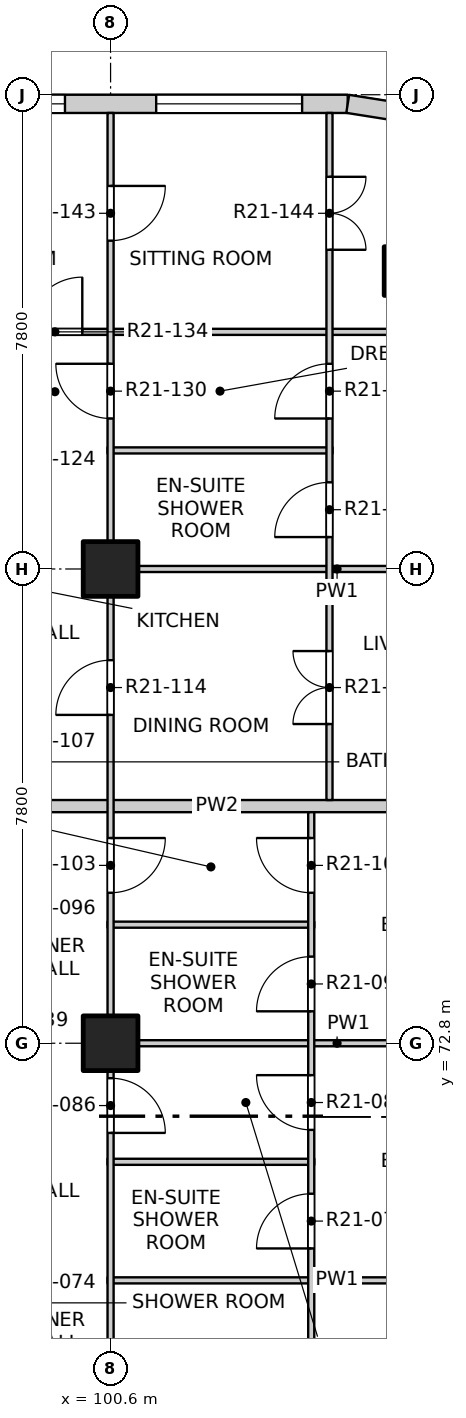
"""IFC4 building model, lengths in metres.
Left out: names, types, materials, properties, quantities, classifications, styles, units other than length and angle.
Written with IfcOpenShell. Run it as: python <this file> out.ifc"""

import sys

from ifc_helpers import new_model, si_unit, direction, frame, frame_2d, origin, origin_2d, place, context, subcontext, project, spatial, rectangle, extrude, element, fill, save


model = new_model("IFC4")
c1 = context("Model", 3, precision=1e-05, world=origin(), true_north=direction((0.0, 1.0)))
c2 = subcontext(c1, "Body", "Model", "MODEL_VIEW")
j1 = project(units=[si_unit("LENGTHUNIT", "METRE"), si_unit("PLANEANGLEUNIT", "RADIAN")], contexts=[c1])
p1 = place(None, origin())
s1 = spatial("IfcSite", under=j1, at=p1, CompositionType="ELEMENT")
p2 = place(p1, origin())
s2 = spatial("IfcBuilding", under=s1, at=p2, CompositionType="ELEMENT")
p3 = place(p2, frame((0.0, 0.0, 214.3)))
s3 = spatial("IfcBuildingStorey", under=s2, at=p3, CompositionType="ELEMENT", Elevation=214.3)
p4 = place(p3, frame((105.5, 85.5, -0.25), z_axis=(0.0, 0.0, 1.0), x_axis=(1.0, 0.0, 0.0)))
e1 = element("IfcColumn", 1, at=p4, inside=s3, PredefinedType="COLUMN", context=c2, shape_type="SweptSolid", body=[
    extrude(rectangle(XDim=0.8, YDim=0.8, at=origin_2d()), origin(), (0.0, 0.0, 1.0), 3.4),
])
for number, where, z_axis, x_axis in (
    (2, (100.6, 72.8, -0.25), (0.0, 0.0, 1.0), (1.0, 0.0, 0.0)),
    (3, (100.6, 80.6, -0.25), (0.0, 0.0, 1.0), (1.0, 0.0, 0.0)),
):
    element("IfcColumn", number, at=place(p3, frame(where, z_axis=z_axis, x_axis=x_axis)), inside=s3, PredefinedType="COLUMN", context=c2, shape_type="SweptSolid", body=[
        extrude(rectangle(XDim=0.9, YDim=0.9, at=origin_2d()), origin(), (0.0, 0.0, 1.0), 3.4),
    ])
p5 = place(p3, frame((97.1, 88.25, 0.0), z_axis=(0.0, 0.0, 1.0), x_axis=(1.0, 0.0, 0.0)))
e4 = element("IfcWall", 4, at=p5, inside=s3, PredefinedType="SOLIDWALL", context=c2, shape_type="SweptSolid", body=[
    extrude(rectangle(XDim=7.4, YDim=0.3, at=frame_2d((3.7, 0.0))), origin(), (0.0, 0.0, 1.0), 2.7),
])
p6 = place(p5, frame((0.35, 0.0, 0.9)))
e5 = element("IfcOpeningElement", 5, at=p6, cuts=e4, PredefinedType="OPENING", context=c2, shape_type="SweptSolid", body=[
    extrude(rectangle(XDim=2.4, YDim=1.8, at=frame_2d((1.2, 0.9))), frame((0.0, 0.16, 0.0), z_axis=(0.0, -1.0, 0.0), x_axis=(1.0, 0.0, 0.0)), (0.0, 0.0, 1.0), 0.32),
])
p7 = place(p5, frame((4.25, 0.0, 0.9)))
e6 = element("IfcOpeningElement", 6, at=p7, cuts=e4, PredefinedType="OPENING", context=c2, shape_type="SweptSolid", body=[
    extrude(rectangle(XDim=2.4, YDim=1.8, at=frame_2d((1.2, 0.9))), frame((0.0, 0.16, 0.0), z_axis=(0.0, -1.0, 0.0), x_axis=(1.0, 0.0, 0.0)), (0.0, 0.0, 1.0), 0.32),
])
p8 = place(p3, frame((105.659, 88.066, 0.0), z_axis=(0.0, 0.0, 1.0), x_axis=(-0.987678452879, 0.156496880861, 0.0)))
e7 = element("IfcWall", 7, at=p8, inside=s3, PredefinedType="SOLIDWALL", context=c2, shape_type="SweptSolid", body=[
    extrude(rectangle(XDim=1.173, YDim=0.3, at=frame_2d((0.586, 0.0))), origin(), (0.0, 0.0, 1.0), 2.7),
])
p9 = place(p3, frame((100.55, 68.9, 0.0), z_axis=(0.0, 0.0, 1.0), x_axis=(1.0, 0.0, 0.0)))
e8 = element("IfcWall", 8, at=p9, inside=s3, PredefinedType="PARTITIONING", context=c2, shape_type="SweptSolid", body=[
    extrude(rectangle(XDim=7.55, YDim=0.1, at=frame_2d((3.775, 0.0))), origin(), (0.0, 0.0, 1.0), 2.55),
])
p10 = place(p3, frame((100.55, 70.85, 0.0), z_axis=(0.0, 0.0, 1.0), x_axis=(1.0, 0.0, 0.0)))
e9 = element("IfcWall", 9, at=p10, inside=s3, PredefinedType="PARTITIONING", context=c2, shape_type="SweptSolid", body=[
    extrude(rectangle(XDim=3.4, YDim=0.1, at=frame_2d((1.7, 0.0))), origin(), (0.0, 0.0, 1.0), 3.15),
])
p11 = place(p3, frame((100.55, 72.8, 0.0), z_axis=(0.0, 0.0, 1.0), x_axis=(1.0, 0.0, 0.0)))
e10 = element("IfcWall", 10, at=p11, inside=s3, PredefinedType="PARTITIONING", context=c2, shape_type="SweptSolid", body=[
    extrude(rectangle(XDim=7.55, YDim=0.1, at=frame_2d((3.775, 0.0))), origin(), (0.0, 0.0, 1.0), 3.15),
])
p12 = place(p3, frame((100.55, 74.75, 0.0), z_axis=(0.0, 0.0, 1.0), x_axis=(1.0, 0.0, 0.0)))
e11 = element("IfcWall", 11, at=p12, inside=s3, PredefinedType="PARTITIONING", context=c2, shape_type="SweptSolid", body=[
    extrude(rectangle(XDim=3.4, YDim=0.1, at=frame_2d((1.7, 0.0))), origin(), (0.0, 0.0, 1.0), 3.15),
])
p13 = place(p3, frame((96.6, 76.7, 0.0), z_axis=(0.0, 0.0, 1.0), x_axis=(1.0, 0.0, 0.0)))
e12 = element("IfcWall", 12, at=p13, inside=s3, PredefinedType="PARTITIONING", context=c2, shape_type="SweptSolid", body=[
    extrude(rectangle(XDim=11.5, YDim=0.2, at=frame_2d((5.75, 0.0))), origin(), (0.0, 0.0, 1.0), 2.55),
])
p14 = place(p3, frame((100.55, 80.6, 0.0), z_axis=(0.0, 0.0, 1.0), x_axis=(1.0, 0.0, 0.0)))
e13 = element("IfcWall", 13, at=p14, inside=s3, PredefinedType="PARTITIONING", context=c2, shape_type="SweptSolid", body=[
    extrude(rectangle(XDim=7.55, YDim=0.1, at=frame_2d((3.775, 0.0))), origin(), (0.0, 0.0, 1.0), 3.15),
])
p15 = place(p3, frame((100.55, 82.55, 0.0), z_axis=(0.0, 0.0, 1.0), x_axis=(1.0, 0.0, 0.0)))
e14 = element("IfcWall", 14, at=p15, inside=s3, PredefinedType="PARTITIONING", context=c2, shape_type="SweptSolid", body=[
    extrude(rectangle(XDim=3.7, YDim=0.1, at=frame_2d((1.85, 0.0))), origin(), (0.0, 0.0, 1.0), 3.15),
])
p16 = place(p3, frame((96.6, 84.5, 0.0), z_axis=(0.0, 0.0, 1.0), x_axis=(1.0, 0.0, 0.0)))
e15 = element("IfcWall", 15, at=p16, inside=s3, PredefinedType="PARTITIONING", context=c2, shape_type="SweptSolid", body=[
    extrude(rectangle(XDim=11.5, YDim=0.1, at=frame_2d((5.75, 0.0))), origin(), (0.0, 0.0, 1.0), 3.15),
])
p17 = place(p16, frame((2.635, 0.0, 0.0)))
e16 = element("IfcOpeningElement", 16, at=p17, cuts=e15, PredefinedType="OPENING", context=c2, shape_type="SweptSolid", body=[
    extrude(rectangle(XDim=0.9, YDim=2.1, at=frame_2d((0.45, 1.05))), frame((0.0, 0.06, 0.0), z_axis=(0.0, -1.0, 0.0), x_axis=(1.0, 0.0, 0.0)), (0.0, 0.0, 1.0), 0.12),
])
p18 = place(p3, frame((100.6, 41.9, 0.0), z_axis=(0.0, 0.0, 1.0), x_axis=(0.0, 1.0, 0.0)))
e17 = element("IfcWall", 17, at=p18, inside=s3, PredefinedType="PARTITIONING", context=c2, shape_type="SweptSolid", body=[
    extrude(rectangle(XDim=46.2, YDim=0.1, at=frame_2d((23.1, 0.0))), origin(), (0.0, 0.0, 1.0), 3.15),
])
p19 = place(p18, frame((1.2, 0.0, 0.0)))
e18 = element("IfcOpeningElement", 18, at=p19, cuts=e17, PredefinedType="OPENING", context=c2, shape_type="SweptSolid", body=[
    extrude(rectangle(XDim=0.9, YDim=2.1, at=frame_2d((0.45, 1.05))), frame((0.0, 0.06, 0.0), z_axis=(0.0, -1.0, 0.0), x_axis=(1.0, 0.0, 0.0)), (0.0, 0.0, 1.0), 0.12),
])
p20 = place(p18, frame((6.025, 0.0, 0.0)))
e19 = element("IfcOpeningElement", 19, at=p20, cuts=e17, PredefinedType="OPENING", context=c2, shape_type="SweptSolid", body=[
    extrude(rectangle(XDim=0.9, YDim=2.1, at=frame_2d((0.45, 1.05))), frame((0.0, 0.06, 0.0), z_axis=(0.0, -1.0, 0.0), x_axis=(1.0, 0.0, 0.0)), (0.0, 0.0, 1.0), 0.12),
])
p21 = place(p18, frame((9.0, 0.0, 0.0)))
e20 = element("IfcOpeningElement", 20, at=p21, cuts=e17, PredefinedType="OPENING", context=c2, shape_type="SweptSolid", body=[
    extrude(rectangle(XDim=0.9, YDim=2.1, at=frame_2d((0.45, 1.05))), frame((0.0, 0.06, 0.0), z_axis=(0.0, -1.0, 0.0), x_axis=(1.0, 0.0, 0.0)), (0.0, 0.0, 1.0), 0.12),
])
p22 = place(p18, frame((13.85, 0.0, 0.0)))
e21 = element("IfcOpeningElement", 21, at=p22, cuts=e17, PredefinedType="OPENING", context=c2, shape_type="SweptSolid", body=[
    extrude(rectangle(XDim=0.9, YDim=2.1, at=frame_2d((0.45, 1.05))), frame((0.0, 0.06, 0.0), z_axis=(0.0, -1.0, 0.0), x_axis=(1.0, 0.0, 0.0)), (0.0, 0.0, 1.0), 0.12),
])
p23 = place(p18, frame((16.8, 0.0, 0.0)))
e22 = element("IfcOpeningElement", 22, at=p23, cuts=e17, PredefinedType="OPENING", context=c2, shape_type="SweptSolid", body=[
    extrude(rectangle(XDim=0.9, YDim=2.1, at=frame_2d((0.45, 1.05))), frame((0.0, 0.06, 0.0), z_axis=(0.0, -1.0, 0.0), x_axis=(1.0, 0.0, 0.0)), (0.0, 0.0, 1.0), 0.12),
])
p24 = place(p18, frame((21.625, 0.0, 0.0)))
e23 = element("IfcOpeningElement", 23, at=p24, cuts=e17, PredefinedType="OPENING", context=c2, shape_type="SweptSolid", body=[
    extrude(rectangle(XDim=0.9, YDim=2.1, at=frame_2d((0.45, 1.05))), frame((0.0, 0.06, 0.0), z_axis=(0.0, -1.0, 0.0), x_axis=(1.0, 0.0, 0.0)), (0.0, 0.0, 1.0), 0.12),
])
p25 = place(p18, frame((24.6, 0.0, 0.0)))
e24 = element("IfcOpeningElement", 24, at=p25, cuts=e17, PredefinedType="OPENING", context=c2, shape_type="SweptSolid", body=[
    extrude(rectangle(XDim=0.9, YDim=2.1, at=frame_2d((0.45, 1.05))), frame((0.0, 0.06, 0.0), z_axis=(0.0, -1.0, 0.0), x_axis=(1.0, 0.0, 0.0)), (0.0, 0.0, 1.0), 0.12),
])
p26 = place(p18, frame((29.425, 0.0, 0.0)))
e25 = element("IfcOpeningElement", 25, at=p26, cuts=e17, PredefinedType="OPENING", context=c2, shape_type="SweptSolid", body=[
    extrude(rectangle(XDim=0.9, YDim=2.1, at=frame_2d((0.45, 1.05))), frame((0.0, 0.06, 0.0), z_axis=(0.0, -1.0, 0.0), x_axis=(1.0, 0.0, 0.0)), (0.0, 0.0, 1.0), 0.12),
])
p27 = place(p18, frame((33.375, 0.0, 0.0)))
e26 = element("IfcOpeningElement", 26, at=p27, cuts=e17, PredefinedType="OPENING", context=c2, shape_type="SweptSolid", body=[
    extrude(rectangle(XDim=0.9, YDim=2.1, at=frame_2d((0.45, 1.05))), frame((0.0, 0.06, 0.0), z_axis=(0.0, -1.0, 0.0), x_axis=(1.0, 0.0, 0.0)), (0.0, 0.0, 1.0), 0.12),
])
p28 = place(p18, frame((36.3, 0.0, 0.0)))
e27 = element("IfcOpeningElement", 27, at=p28, cuts=e17, PredefinedType="OPENING", context=c2, shape_type="SweptSolid", body=[
    extrude(rectangle(XDim=0.9, YDim=2.1, at=frame_2d((0.45, 1.05))), frame((0.0, 0.06, 0.0), z_axis=(0.0, -1.0, 0.0), x_axis=(1.0, 0.0, 0.0)), (0.0, 0.0, 1.0), 0.12),
])
p29 = place(p18, frame((41.175, 0.0, 0.0)))
e28 = element("IfcOpeningElement", 28, at=p29, cuts=e17, PredefinedType="OPENING", context=c2, shape_type="SweptSolid", body=[
    extrude(rectangle(XDim=0.9, YDim=2.1, at=frame_2d((0.45, 1.05))), frame((0.0, 0.06, 0.0), z_axis=(0.0, -1.0, 0.0), x_axis=(1.0, 0.0, 0.0)), (0.0, 0.0, 1.0), 0.12),
])
p30 = place(p18, frame((44.1, 0.0, 0.0)))
e29 = element("IfcOpeningElement", 29, at=p30, cuts=e17, PredefinedType="OPENING", context=c2, shape_type="SweptSolid", body=[
    extrude(rectangle(XDim=0.9, YDim=2.1, at=frame_2d((0.45, 1.05))), frame((0.0, 0.06, 0.0), z_axis=(0.0, -1.0, 0.0), x_axis=(1.0, 0.0, 0.0)), (0.0, 0.0, 1.0), 0.12),
])
p31 = place(p3, frame((103.9, 65.1, 0.0), z_axis=(0.0, 0.0, 1.0), x_axis=(0.0, 1.0, 0.0)))
e30 = element("IfcWall", 30, at=p31, inside=s3, PredefinedType="PARTITIONING", context=c2, shape_type="SweptSolid", body=[
    extrude(rectangle(XDim=11.5, YDim=0.1, at=frame_2d((5.75, 0.0))), origin(), (0.0, 0.0, 1.0), 3.15),
])
p32 = place(p31, frame((1.25, 0.0, 0.0)))
e31 = element("IfcOpeningElement", 31, at=p32, cuts=e30, PredefinedType="OPENING", context=c2, shape_type="SweptSolid", body=[
    extrude(rectangle(XDim=1.2, YDim=2.1, at=frame_2d((0.6, 1.05))), frame((0.0, 0.06, 0.0), z_axis=(0.0, -1.0, 0.0), x_axis=(1.0, 0.0, 0.0)), (0.0, 0.0, 1.0), 0.12),
])
p33 = place(p31, frame((4.325, 0.0, 0.0)))
e32 = element("IfcOpeningElement", 32, at=p33, cuts=e30, PredefinedType="OPENING", context=c2, shape_type="SweptSolid", body=[
    extrude(rectangle(XDim=0.9, YDim=2.1, at=frame_2d((0.45, 1.05))), frame((0.0, 0.06, 0.0), z_axis=(0.0, -1.0, 0.0), x_axis=(1.0, 0.0, 0.0)), (0.0, 0.0, 1.0), 0.12),
])
p34 = place(p31, frame((6.275, 0.0, 0.0)))
e33 = element("IfcOpeningElement", 33, at=p34, cuts=e30, PredefinedType="OPENING", context=c2, shape_type="SweptSolid", body=[
    extrude(rectangle(XDim=0.9, YDim=2.1, at=frame_2d((0.45, 1.05))), frame((0.0, 0.06, 0.0), z_axis=(0.0, -1.0, 0.0), x_axis=(1.0, 0.0, 0.0)), (0.0, 0.0, 1.0), 0.12),
])
p35 = place(p31, frame((8.225, 0.0, 0.0)))
e34 = element("IfcOpeningElement", 34, at=p35, cuts=e30, PredefinedType="OPENING", context=c2, shape_type="SweptSolid", body=[
    extrude(rectangle(XDim=0.9, YDim=2.1, at=frame_2d((0.45, 1.05))), frame((0.0, 0.06, 0.0), z_axis=(0.0, -1.0, 0.0), x_axis=(1.0, 0.0, 0.0)), (0.0, 0.0, 1.0), 0.12),
])
p36 = place(p31, frame((10.175, 0.0, 0.0)))
e35 = element("IfcOpeningElement", 35, at=p36, cuts=e30, PredefinedType="OPENING", context=c2, shape_type="SweptSolid", body=[
    extrude(rectangle(XDim=0.9, YDim=2.1, at=frame_2d((0.45, 1.05))), frame((0.0, 0.06, 0.0), z_axis=(0.0, -1.0, 0.0), x_axis=(1.0, 0.0, 0.0)), (0.0, 0.0, 1.0), 0.12),
])
p37 = place(p3, frame((104.2, 76.8, 0.0), z_axis=(0.0, 0.0, 1.0), x_axis=(0.0, 1.0, 0.0)))
e36 = element("IfcWall", 36, at=p37, inside=s3, PredefinedType="PARTITIONING", context=c2, shape_type="SweptSolid", body=[
    extrude(rectangle(XDim=11.3, YDim=0.1, at=frame_2d((5.65, 0.0))), origin(), (0.0, 0.0, 1.0), 3.15),
])
p38 = place(p37, frame((1.25, 0.0, 0.0)))
e37 = element("IfcOpeningElement", 37, at=p38, cuts=e36, PredefinedType="OPENING", context=c2, shape_type="SweptSolid", body=[
    extrude(rectangle(XDim=1.2, YDim=2.1, at=frame_2d((0.6, 1.05))), frame((0.0, 0.06, 0.0), z_axis=(0.0, -1.0, 0.0), x_axis=(1.0, 0.0, 0.0)), (0.0, 0.0, 1.0), 0.12),
])
p39 = place(p37, frame((4.325, 0.0, 0.0)))
e38 = element("IfcOpeningElement", 38, at=p39, cuts=e36, PredefinedType="OPENING", context=c2, shape_type="SweptSolid", body=[
    extrude(rectangle(XDim=0.9, YDim=2.1, at=frame_2d((0.45, 1.05))), frame((0.0, 0.06, 0.0), z_axis=(0.0, -1.0, 0.0), x_axis=(1.0, 0.0, 0.0)), (0.0, 0.0, 1.0), 0.12),
])
p40 = place(p37, frame((6.275, 0.0, 0.0)))
e39 = element("IfcOpeningElement", 39, at=p40, cuts=e36, PredefinedType="OPENING", context=c2, shape_type="SweptSolid", body=[
    extrude(rectangle(XDim=0.9, YDim=2.1, at=frame_2d((0.45, 1.05))), frame((0.0, 0.06, 0.0), z_axis=(0.0, -1.0, 0.0), x_axis=(1.0, 0.0, 0.0)), (0.0, 0.0, 1.0), 0.12),
])
p41 = place(p37, frame((9.05, 0.0, 0.0)))
e40 = element("IfcOpeningElement", 40, at=p41, cuts=e36, PredefinedType="OPENING", context=c2, shape_type="SweptSolid", body=[
    extrude(rectangle(XDim=1.2, YDim=2.1, at=frame_2d((0.6, 1.05))), frame((0.0, 0.06, 0.0), z_axis=(0.0, -1.0, 0.0), x_axis=(1.0, 0.0, 0.0)), (0.0, 0.0, 1.0), 0.12),
])
p42 = place(p6, origin())
e41 = element("IfcWindow", 41, at=p42, inside=s3, PartitioningType="DOUBLE_PANEL_VERTICAL", PredefinedType="WINDOW", context=c2, shape_type="SweptSolid", body=[
    extrude(rectangle(XDim=2.4, YDim=1.8, at=frame_2d((1.2, 0.9))), frame((0.0, 0.03, 0.0), z_axis=(0.0, -1.0, 0.0), x_axis=(1.0, 0.0, 0.0)), (0.0, 0.0, 1.0), 0.06),
])
fill(e5, e41)
p43 = place(p7, origin())
e42 = element("IfcWindow", 42, at=p43, inside=s3, PartitioningType="DOUBLE_PANEL_VERTICAL", PredefinedType="WINDOW", context=c2, shape_type="SweptSolid", body=[
    extrude(rectangle(XDim=2.4, YDim=1.8, at=frame_2d((1.2, 0.9))), frame((0.0, 0.03, 0.0), z_axis=(0.0, -1.0, 0.0), x_axis=(1.0, 0.0, 0.0)), (0.0, 0.0, 1.0), 0.06),
])
fill(e6, e42)
p44 = place(p33, origin())
e43 = element("IfcDoor", 43, at=p44, inside=s3, OperationType="SINGLE_SWING_LEFT", PredefinedType="DOOR", context=c2, shape_type="SweptSolid", body=[
    extrude(rectangle(XDim=0.9, YDim=2.1, at=frame_2d((0.45, 1.05))), frame((0.0, 0.025, 0.0), z_axis=(0.0, -1.0, 0.0), x_axis=(1.0, 0.0, 0.0)), (0.0, 0.0, 1.0), 0.05),
])
fill(e32, e43)
p45 = place(p26, origin())
e44 = element("IfcDoor", 44, at=p45, inside=s3, OperationType="SINGLE_SWING_RIGHT", PredefinedType="DOOR", context=c2, shape_type="SweptSolid", body=[
    extrude(rectangle(XDim=0.9, YDim=2.1, at=frame_2d((0.45, 1.05))), frame((0.0, 0.025, 0.0), z_axis=(0.0, -1.0, 0.0), x_axis=(1.0, 0.0, 0.0)), (0.0, 0.0, 1.0), 0.05),
])
fill(e25, e44)
p46 = place(p34, origin())
e45 = element("IfcDoor", 45, at=p46, inside=s3, OperationType="SINGLE_SWING_RIGHT", PredefinedType="DOOR", context=c2, shape_type="SweptSolid", body=[
    extrude(rectangle(XDim=0.9, YDim=2.1, at=frame_2d((0.45, 1.05))), frame((0.0, 0.025, 0.0), z_axis=(0.0, -1.0, 0.0), x_axis=(1.0, 0.0, 0.0)), (0.0, 0.0, 1.0), 0.05),
])
fill(e33, e45)
p47 = place(p35, origin())
e46 = element("IfcDoor", 46, at=p47, inside=s3, OperationType="SINGLE_SWING_LEFT", PredefinedType="DOOR", context=c2, shape_type="SweptSolid", body=[
    extrude(rectangle(XDim=0.9, YDim=2.1, at=frame_2d((0.45, 1.05))), frame((0.0, 0.025, 0.0), z_axis=(0.0, -1.0, 0.0), x_axis=(1.0, 0.0, 0.0)), (0.0, 0.0, 1.0), 0.05),
])
fill(e34, e46)
p48 = place(p27, origin())
e47 = element("IfcDoor", 47, at=p48, inside=s3, OperationType="SINGLE_SWING_LEFT", PredefinedType="DOOR", context=c2, shape_type="SweptSolid", body=[
    extrude(rectangle(XDim=0.9, YDim=2.1, at=frame_2d((0.45, 1.05))), frame((0.0, 0.025, 0.0), z_axis=(0.0, -1.0, 0.0), x_axis=(1.0, 0.0, 0.0)), (0.0, 0.0, 1.0), 0.05),
])
fill(e26, e47)
p49 = place(p36, origin())
e48 = element("IfcDoor", 48, at=p49, inside=s3, OperationType="SINGLE_SWING_RIGHT", PredefinedType="DOOR", context=c2, shape_type="SweptSolid", body=[
    extrude(rectangle(XDim=0.9, YDim=2.1, at=frame_2d((0.45, 1.05))), frame((0.0, 0.025, 0.0), z_axis=(0.0, -1.0, 0.0), x_axis=(1.0, 0.0, 0.0)), (0.0, 0.0, 1.0), 0.05),
])
fill(e35, e48)
p50 = place(p28, origin())
e49 = element("IfcDoor", 49, at=p50, inside=s3, OperationType="SINGLE_SWING_LEFT", PredefinedType="DOOR", context=c2, shape_type="SweptSolid", body=[
    extrude(rectangle(XDim=0.9, YDim=2.1, at=frame_2d((0.45, 1.05))), frame((0.0, 0.025, 0.0), z_axis=(0.0, -1.0, 0.0), x_axis=(1.0, 0.0, 0.0)), (0.0, 0.0, 1.0), 0.05),
])
fill(e27, e49)
p51 = place(p38, origin())
e50 = element("IfcDoor", 50, at=p51, inside=s3, OperationType="DOUBLE_DOOR_SINGLE_SWING", PredefinedType="DOOR", context=c2, shape_type="SweptSolid", body=[
    extrude(rectangle(XDim=1.2, YDim=2.1, at=frame_2d((0.6, 1.05))), frame((0.0, 0.025, 0.0), z_axis=(0.0, -1.0, 0.0), x_axis=(1.0, 0.0, 0.0)), (0.0, 0.0, 1.0), 0.05),
])
fill(e37, e50)
p52 = place(p39, origin())
e51 = element("IfcDoor", 51, at=p52, inside=s3, OperationType="SINGLE_SWING_LEFT", PredefinedType="DOOR", context=c2, shape_type="SweptSolid", body=[
    extrude(rectangle(XDim=0.9, YDim=2.1, at=frame_2d((0.45, 1.05))), frame((0.0, 0.025, 0.0), z_axis=(0.0, -1.0, 0.0), x_axis=(1.0, 0.0, 0.0)), (0.0, 0.0, 1.0), 0.05),
])
fill(e38, e51)
p53 = place(p29, origin())
e52 = element("IfcDoor", 52, at=p53, inside=s3, OperationType="SINGLE_SWING_RIGHT", PredefinedType="DOOR", context=c2, shape_type="SweptSolid", body=[
    extrude(rectangle(XDim=0.9, YDim=2.1, at=frame_2d((0.45, 1.05))), frame((0.0, 0.025, 0.0), z_axis=(0.0, -1.0, 0.0), x_axis=(1.0, 0.0, 0.0)), (0.0, 0.0, 1.0), 0.05),
])
fill(e28, e52)
p54 = place(p40, origin())
e53 = element("IfcDoor", 53, at=p54, inside=s3, OperationType="SINGLE_SWING_LEFT", PredefinedType="DOOR", context=c2, shape_type="SweptSolid", body=[
    extrude(rectangle(XDim=0.9, YDim=2.1, at=frame_2d((0.45, 1.05))), frame((0.0, 0.025, 0.0), z_axis=(0.0, -1.0, 0.0), x_axis=(1.0, 0.0, 0.0)), (0.0, 0.0, 1.0), 0.05),
])
fill(e39, e53)
p55 = place(p17, origin())
e54 = element("IfcDoor", 54, at=p55, inside=s3, OperationType="SINGLE_SWING_RIGHT", PredefinedType="DOOR", context=c2, shape_type="SweptSolid", body=[
    extrude(rectangle(XDim=0.9, YDim=2.1, at=frame_2d((0.45, 1.05))), frame((0.0, 0.025, 0.0), z_axis=(0.0, -1.0, 0.0), x_axis=(1.0, 0.0, 0.0)), (0.0, 0.0, 1.0), 0.05),
])
fill(e16, e54)
p56 = place(p30, origin())
e55 = element("IfcDoor", 55, at=p56, inside=s3, OperationType="SINGLE_SWING_LEFT", PredefinedType="DOOR", context=c2, shape_type="SweptSolid", body=[
    extrude(rectangle(XDim=0.9, YDim=2.1, at=frame_2d((0.45, 1.05))), frame((0.0, 0.025, 0.0), z_axis=(0.0, -1.0, 0.0), x_axis=(1.0, 0.0, 0.0)), (0.0, 0.0, 1.0), 0.05),
])
fill(e29, e55)
p57 = place(p41, origin())
e56 = element("IfcDoor", 56, at=p57, inside=s3, OperationType="DOUBLE_DOOR_SINGLE_SWING", PredefinedType="DOOR", context=c2, shape_type="SweptSolid", body=[
    extrude(rectangle(XDim=1.2, YDim=2.1, at=frame_2d((0.6, 1.05))), frame((0.0, 0.025, 0.0), z_axis=(0.0, -1.0, 0.0), x_axis=(1.0, 0.0, 0.0)), (0.0, 0.0, 1.0), 0.05),
])
fill(e40, e56)
save(model, sys.argv[1])
